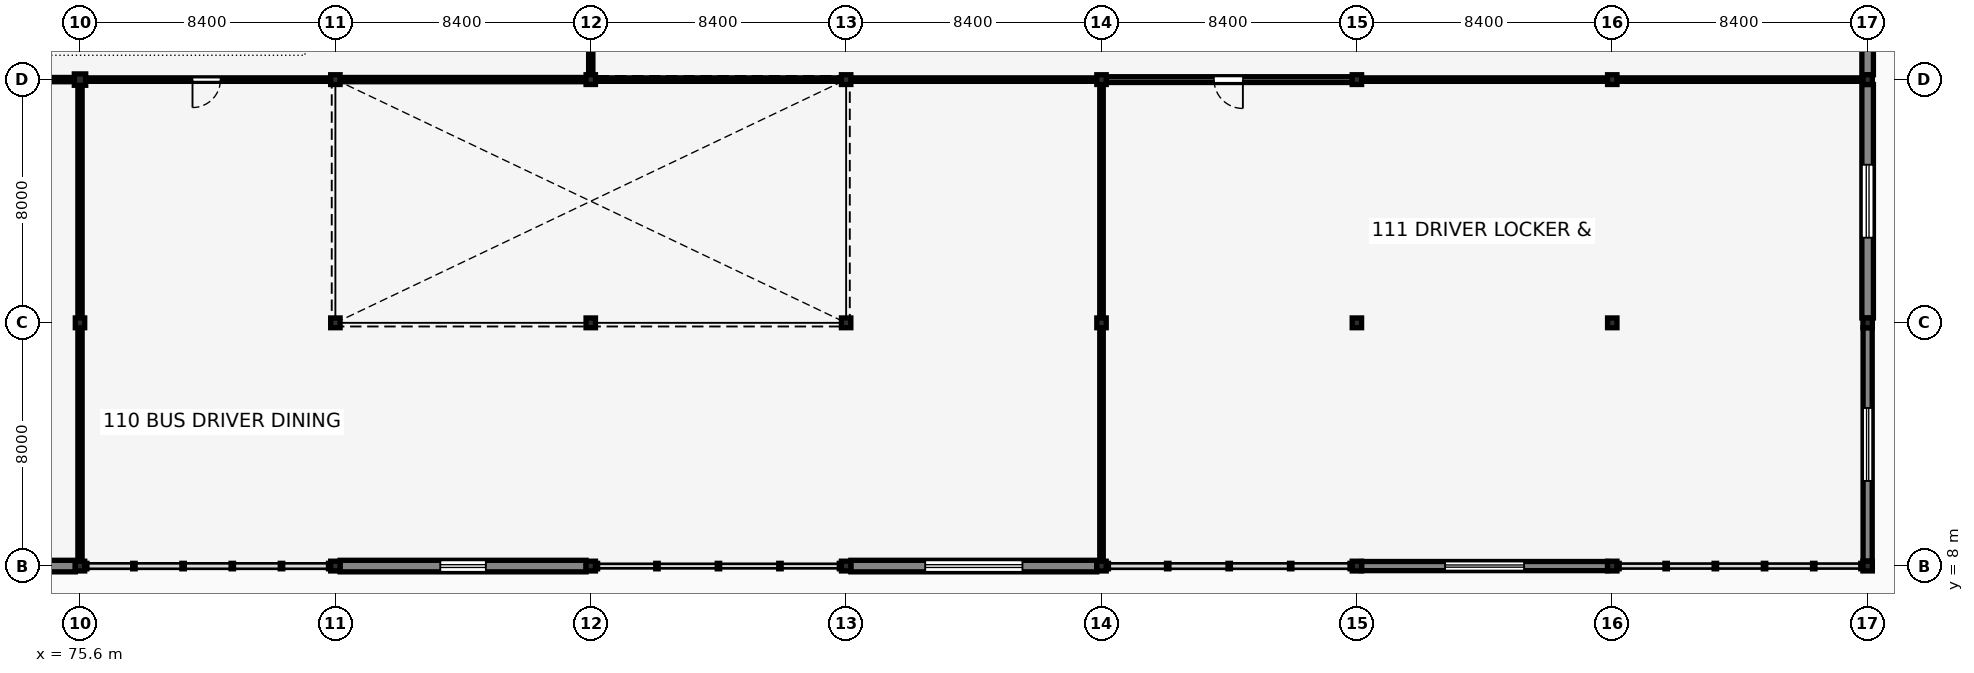
"""IFC4 building model, lengths in metres.
Left out: names, types, materials, properties, quantities, classifications, styles, units other than length and angle.
Written with IfcOpenShell. Run it as: python <this file> out.ifc"""

import sys

from ifc_helpers import new_model, si_unit, direction, frame, frame_2d, origin, origin_2d, place, context, subcontext, project, spatial, rectangle, i_section, extrude, element, fill, save


model = new_model("IFC4")
c1 = context("Model", 3, precision=1e-05, world=origin(), true_north=direction((0.0, 1.0)))
c2 = subcontext(c1, "Body", "Model", "MODEL_VIEW")
j1 = project(units=[si_unit("LENGTHUNIT", "METRE"), si_unit("PLANEANGLEUNIT", "RADIAN")], contexts=[c1])
p1 = place(None, origin())
s1 = spatial("IfcSite", under=j1, at=p1, CompositionType="ELEMENT")
p2 = place(p1, origin())
s2 = spatial("IfcBuilding", under=s1, at=p2, CompositionType="ELEMENT")
p3 = place(p2, frame((0.0, 0.0, 5.44)))
s3 = spatial("IfcBuildingStorey", under=s2, at=p3, CompositionType="ELEMENT", Elevation=5.44)
for number, where, z_axis, x_axis in (
    (1, (75.6, 8.0, 0.0), (0.0, 0.0, 1.0), (1.0, 0.0, 0.0)),
    (2, (75.6, 16.0, 0.0), (0.0, 0.0, 1.0), (1.0, 0.0, 0.0)),
):
    element("IfcColumn", number, at=place(p3, frame(where, z_axis=z_axis, x_axis=x_axis)), inside=s3, PredefinedType="COLUMN", context=c2, shape_type="SweptSolid", body=[
        extrude(i_section(OverallWidth=0.309, OverallDepth=0.321, WebThickness=0.014, FlangeThickness=0.022, FilletRadius=0.015, at=origin_2d()), origin(), (0.0, 0.0, 1.0), 3.8),
    ])
p4 = place(p3, frame((75.6, 24.0, 0.0), z_axis=(0.0, 0.0, 1.0), x_axis=(1.0, 0.0, 0.0)))
e3 = element("IfcColumn", 3, at=p4, inside=s3, PredefinedType="COLUMN", context=c2, shape_type="SweptSolid", body=[
    extrude(i_section(OverallWidth=0.375, OverallDepth=0.375, WebThickness=0.017, FlangeThickness=0.027, FilletRadius=0.015, at=origin_2d()), origin(), (0.0, 0.0, 1.0), 3.8),
])
for number, where, z_axis, x_axis in (
    (4, (84.0, 8.0, 0.0), (0.0, 0.0, 1.0), (1.0, 0.0, 0.0)),
    (5, (84.0, 16.0, 0.0), (0.0, 0.0, 1.0), (1.0, 0.0, 0.0)),
    (6, (84.0, 24.0, 0.0), (0.0, 0.0, 1.0), (1.0, 0.0, 0.0)),
    (7, (92.4, 8.0, 0.0), (0.0, 0.0, 1.0), (1.0, 0.0, 0.0)),
    (8, (92.4, 16.0, 0.0), (0.0, 0.0, 1.0), (1.0, 0.0, 0.0)),
    (9, (92.4, 24.0, 0.0), (0.0, 0.0, 1.0), (1.0, 0.0, 0.0)),
    (10, (100.8, 8.0, 0.0), (0.0, 0.0, 1.0), (1.0, 0.0, 0.0)),
    (11, (100.8, 16.0, 0.0), (0.0, 0.0, 1.0), (1.0, 0.0, 0.0)),
    (12, (100.8, 24.0, 0.0), (0.0, 0.0, 1.0), (1.0, 0.0, 0.0)),
    (13, (109.2, 8.0, 0.0), (0.0, 0.0, 1.0), (1.0, 0.0, 0.0)),
    (14, (109.2, 16.0, 0.0), (0.0, 0.0, 1.0), (1.0, 0.0, 0.0)),
    (15, (109.2, 24.0, 0.0), (0.0, 0.0, 1.0), (1.0, 0.0, 0.0)),
    (16, (117.6, 8.0, 0.0), (0.0, 0.0, 1.0), (1.0, 0.0, 0.0)),
    (17, (117.6, 16.0, 0.0), (0.0, 0.0, 1.0), (1.0, 0.0, 0.0)),
    (18, (117.6, 24.0, 0.0), (0.0, 0.0, 1.0), (1.0, 0.0, 0.0)),
    (19, (126.0, 8.0, 0.0), (0.0, 0.0, 1.0), (1.0, 0.0, 0.0)),
    (20, (126.0, 16.0, 0.0), (0.0, 0.0, 1.0), (1.0, 0.0, 0.0)),
    (21, (126.0, 24.0, 0.0), (0.0, 0.0, 1.0), (1.0, 0.0, 0.0)),
    (22, (134.4, 8.0, 0.0), (0.0, 0.0, 1.0), (1.0, 0.0, 0.0)),
    (23, (134.4, 16.0, 0.0), (0.0, 0.0, 1.0), (1.0, 0.0, 0.0)),
    (24, (134.4, 24.0, 0.0), (0.0, 0.0, 1.0), (1.0, 0.0, 0.0)),
):
    element("IfcColumn", number, at=place(p3, frame(where, z_axis=z_axis, x_axis=x_axis)), inside=s3, PredefinedType="COLUMN", context=c2, shape_type="SweptSolid", body=[
        extrude(i_section(OverallWidth=0.309, OverallDepth=0.321, WebThickness=0.014, FlangeThickness=0.022, FilletRadius=0.015, at=origin_2d()), origin(), (0.0, 0.0, 1.0), 3.8),
    ])
p5 = place(p3, frame((134.4, 8.16, 0.0), z_axis=(0.0, 0.0, 1.0), x_axis=(0.0, 1.0, 0.0)))
e25 = element("IfcWall", 25, at=p5, inside=s3, PredefinedType="SOLIDWALL", context=c2, shape_type="SweptSolid", body=[
    extrude(rectangle(XDim=7.679, YDim=0.3, at=frame_2d((3.84, 0.0))), origin(), (0.0, 0.0, 1.0), 3.442),
])
p6 = place(p5, frame((2.64, 0.0, 0.9), z_axis=(0.0, 0.0, 1.0), x_axis=(1.0, 0.0, 0.0)))
e26 = element("IfcOpeningElement", 26, at=p6, cuts=e25, PredefinedType="OPENING", context=c2, shape_type="SweptSolid", body=[
    extrude(rectangle(XDim=2.4, YDim=1.75, at=frame_2d((1.2, 0.875))), frame((0.0, 0.16, 0.0), z_axis=(0.0, -1.0, 0.0), x_axis=(1.0, 0.0, 0.0)), (0.0, 0.0, 1.0), 0.32),
])
p7 = place(p3, frame((134.4, 16.16, 0.0), z_axis=(0.0, 0.0, 1.0), x_axis=(0.0, 1.0, 0.0)))
e27 = element("IfcWall", 27, at=p7, inside=s3, PredefinedType="SOLIDWALL", context=c2, shape_type="SweptSolid", body=[
    extrude(rectangle(XDim=7.679, YDim=0.38, at=frame_2d((3.84, 0.0))), origin(), (0.0, 0.0, 1.0), 3.442),
])
p8 = place(p7, frame((2.64, 0.0, 0.9), z_axis=(0.0, 0.0, 1.0), x_axis=(1.0, 0.0, 0.0)))
e28 = element("IfcOpeningElement", 28, at=p8, cuts=e27, PredefinedType="OPENING", context=c2, shape_type="SweptSolid", body=[
    extrude(rectangle(XDim=2.4, YDim=1.5, at=frame_2d((1.2, 0.75))), frame((0.0, 0.2, 0.0), z_axis=(0.0, -1.0, 0.0), x_axis=(1.0, 0.0, 0.0)), (0.0, 0.0, 1.0), 0.4),
])
p9 = place(p3, frame((134.4, 24.16, 0.0), z_axis=(0.0, 0.0, 1.0), x_axis=(0.0, 1.0, 0.0)))
e29 = element("IfcWall", 29, at=p9, inside=s3, PredefinedType="SOLIDWALL", context=c2, shape_type="SweptSolid", body=[
    extrude(rectangle(XDim=7.679, YDim=0.38, at=frame_2d((3.84, 0.0))), origin(), (0.0, 0.0, 1.0), 3.442),
])
p10 = place(p9, frame((2.74, 0.0, 0.9), z_axis=(0.0, 0.0, 1.0), x_axis=(1.0, 0.0, 0.0)))
e30 = element("IfcOpeningElement", 30, at=p10, cuts=e29, PredefinedType="OPENING", context=c2, shape_type="SweptSolid", body=[
    extrude(rectangle(XDim=2.2, YDim=1.5, at=frame_2d((1.1, 0.75))), frame((0.0, 0.2, 0.0), z_axis=(0.0, -1.0, 0.0), x_axis=(1.0, 0.0, 0.0)), (0.0, 0.0, 1.0), 0.4),
])
p11 = place(p3, frame((67.354, 8.0, 0.0), z_axis=(0.0, 0.0, 1.0), x_axis=(1.0, 0.0, 0.0)))
e31 = element("IfcWall", 31, at=p11, inside=s3, PredefinedType="SOLIDWALL", context=c2, shape_type="SweptSolid", body=[
    extrude(rectangle(XDim=8.091, YDim=0.38, at=frame_2d((4.045, 0.0))), origin(), (0.0, 0.0, 1.0), 3.45),
])
p12 = place(p11, frame((3.146, 0.0, 0.9), z_axis=(0.0, 0.0, 1.0), x_axis=(1.0, 0.0, 0.0)))
e32 = element("IfcOpeningElement", 32, at=p12, cuts=e31, PredefinedType="OPENING", context=c2, shape_type="SweptSolid", body=[
    extrude(rectangle(XDim=1.8, YDim=1.3, at=frame_2d((0.9, 0.65))), frame((0.0, 0.2, 0.0), z_axis=(0.0, -1.0, 0.0), x_axis=(1.0, 0.0, 0.0)), (0.0, 0.0, 1.0), 0.4),
])
p13 = place(p3, frame((84.155, 8.0, 0.0), z_axis=(0.0, 0.0, 1.0), x_axis=(1.0, 0.0, 0.0)))
e33 = element("IfcWall", 33, at=p13, inside=s3, PredefinedType="SOLIDWALL", context=c2, shape_type="SweptSolid", body=[
    extrude(rectangle(XDim=8.091, YDim=0.38, at=frame_2d((4.045, 0.0))), origin(), (0.0, 0.0, 1.0), 3.45),
])
p14 = place(p13, frame((3.295, 0.0, 0.9), z_axis=(0.0, 0.0, 1.0), x_axis=(1.0, 0.0, 0.0)))
e34 = element("IfcOpeningElement", 34, at=p14, cuts=e33, PredefinedType="OPENING", context=c2, shape_type="SweptSolid", body=[
    extrude(rectangle(XDim=1.5, YDim=1.4, at=frame_2d((0.75, 0.7))), frame((0.0, 0.2, 0.0), z_axis=(0.0, -1.0, 0.0), x_axis=(1.0, 0.0, 0.0)), (0.0, 0.0, 1.0), 0.4),
])
p15 = place(p3, frame((100.955, 8.0, 0.0), z_axis=(0.0, 0.0, 1.0), x_axis=(1.0, 0.0, 0.0)))
e35 = element("IfcWall", 35, at=p15, inside=s3, PredefinedType="SOLIDWALL", context=c2, shape_type="SweptSolid", body=[
    extrude(rectangle(XDim=8.091, YDim=0.38, at=frame_2d((4.045, 0.0))), origin(), (0.0, 0.0, 1.0), 3.45),
])
p16 = place(p15, frame((2.445, 0.0, 1.55), z_axis=(0.0, 0.0, 1.0), x_axis=(1.0, 0.0, 0.0)))
e36 = element("IfcOpeningElement", 36, at=p16, cuts=e35, PredefinedType="OPENING", context=c2, shape_type="SweptSolid", body=[
    extrude(rectangle(XDim=3.2, YDim=0.9, at=frame_2d((1.6, 0.45))), frame((0.0, 0.2, 0.0), z_axis=(0.0, -1.0, 0.0), x_axis=(1.0, 0.0, 0.0)), (0.0, 0.0, 1.0), 0.4),
])
p17 = place(p3, frame((117.755, 8.0, 0.0), z_axis=(0.0, 0.0, 1.0), x_axis=(1.0, 0.0, 0.0)))
e37 = element("IfcWall", 37, at=p17, inside=s3, PredefinedType="SOLIDWALL", context=c2, shape_type="SweptSolid", body=[
    extrude(rectangle(XDim=8.091, YDim=0.3, at=frame_2d((4.045, 0.0))), origin(), (0.0, 0.0, 1.0), 3.45),
])
p18 = place(p17, frame((2.745, 0.0, 1.55), z_axis=(0.0, 0.0, 1.0), x_axis=(1.0, 0.0, 0.0)))
e38 = element("IfcOpeningElement", 38, at=p18, cuts=e37, PredefinedType="OPENING", context=c2, shape_type="SweptSolid", body=[
    extrude(rectangle(XDim=2.6, YDim=0.85, at=frame_2d((1.3, 0.425))), frame((0.0, 0.16, 0.0), z_axis=(0.0, -1.0, 0.0), x_axis=(1.0, 0.0, 0.0)), (0.0, 0.0, 1.0), 0.32),
])
p19 = place(p3, frame((75.777, 24.0, 0.0), z_axis=(0.0, 0.0, 1.0), x_axis=(1.0, 0.0, 0.0)))
e39 = element("IfcWall", 39, at=p19, inside=s3, PredefinedType="PARTITIONING", context=c2, shape_type="SweptSolid", body=[
    extrude(rectangle(XDim=8.078, YDim=0.115, at=frame_2d((4.039, 0.0))), origin(), (0.0, 0.0, 1.0), 3.26),
])
p20 = place(p19, frame((4.443, 0.0, 0.0), z_axis=(0.0, 0.0, 1.0), x_axis=(-1.0, 0.0, 0.0)))
e40 = element("IfcOpeningElement", 40, at=p20, cuts=e39, PredefinedType="OPENING", context=c2, shape_type="SweptSolid", body=[
    extrude(rectangle(XDim=0.92, YDim=2.12, at=frame_2d((0.46, 1.06))), frame((0.0, 0.067, 0.0), z_axis=(0.0, -1.0, 0.0), x_axis=(1.0, 0.0, 0.0)), (0.0, 0.0, 1.0), 0.135),
])
p21 = place(p3, frame((109.344, 24.0, 0.0), z_axis=(0.0, 0.0, 1.0), x_axis=(1.0, 0.0, 0.0)))
e41 = element("IfcWall", 41, at=p21, inside=s3, PredefinedType="PLUMBINGWALL", context=c2, shape_type="SweptSolid", body=[
    extrude(rectangle(XDim=8.111, YDim=0.19, at=frame_2d((4.055, 0.0))), origin(), (0.0, 0.0, 1.0), 3.26),
])
p22 = place(p21, frame((4.505, 0.0, 0.0), z_axis=(0.0, 0.0, 1.0), x_axis=(-1.0, 0.0, 0.0)))
e42 = element("IfcOpeningElement", 42, at=p22, cuts=e41, PredefinedType="OPENING", context=c2, shape_type="SweptSolid", body=[
    extrude(rectangle(XDim=0.95, YDim=2.15, at=frame_2d((0.475, 1.075))), frame((0.0, 0.105, 0.0), z_axis=(0.0, -1.0, 0.0), x_axis=(1.0, 0.0, 0.0)), (0.0, 0.0, 1.0), 0.21),
])
p23 = place(p3, frame((67.377, 24.0, 0.0), z_axis=(0.0, 0.0, 1.0), x_axis=(1.0, 0.0, 0.0)))
e43 = element("IfcWall", 43, at=p23, inside=s3, PredefinedType="PARTITIONING", context=c2, shape_type="SweptSolid", body=[
    extrude(rectangle(XDim=8.045, YDim=0.14, at=frame_2d((4.023, 0.0))), origin(), (0.0, 0.0, 1.0), 3.26),
])
p24 = place(p3, frame((84.145, 24.0, 0.0), z_axis=(0.0, 0.0, 1.0), x_axis=(1.0, 0.0, 0.0)))
e44 = element("IfcWall", 44, at=p24, inside=s3, PredefinedType="PARTITIONING", context=c2, shape_type="SweptSolid", body=[
    extrude(rectangle(XDim=8.111, YDim=0.14, at=frame_2d((4.055, 0.0))), origin(), (0.0, 0.0, 1.0), 3.26),
])
p25 = place(p3, frame((92.4, 24.15, 0.0), z_axis=(0.0, 0.0, 1.0), x_axis=(0.0, 1.0, 0.0)))
e45 = element("IfcWall", 45, at=p25, inside=s3, PredefinedType="PARTITIONING", context=c2, shape_type="SweptSolid", body=[
    extrude(rectangle(XDim=7.699, YDim=0.14, at=frame_2d((3.85, 0.0))), origin(), (0.0, 0.0, 1.0), 3.337),
])
for number, where, z_axis, x_axis in (
    (46, (92.545, 24.0, 0.0), (0.0, 0.0, 1.0), (1.0, 0.0, 0.0)),
    (47, (100.945, 24.0, 0.0), (0.0, 0.0, 1.0), (1.0, 0.0, 0.0)),
    (48, (117.745, 24.0, 0.0), (0.0, 0.0, 1.0), (1.0, 0.0, 0.0)),
    (49, (126.145, 24.0, 0.0), (0.0, 0.0, 1.0), (1.0, 0.0, 0.0)),
):
    element("IfcWall", number, at=place(p3, frame(where, z_axis=z_axis, x_axis=x_axis)), inside=s3, PredefinedType="PARTITIONING", context=c2, shape_type="SweptSolid", body=[
        extrude(rectangle(XDim=8.111, YDim=0.115, at=frame_2d((4.055, 0.0))), origin(), (0.0, 0.0, 1.0), 3.26),
    ])
p26 = place(p3, frame((75.6, 8.15, 0.0), z_axis=(0.0, 0.0, 1.0), x_axis=(0.0, 1.0, 0.0)))
e50 = element("IfcWall", 50, at=p26, inside=s3, PredefinedType="PARTITIONING", context=c2, shape_type="SweptSolid", body=[
    extrude(rectangle(XDim=7.699, YDim=0.14, at=frame_2d((3.85, 0.0))), origin(), (0.0, 0.0, 1.0), 3.337),
])
p27 = place(p3, frame((75.6, 16.15, 0.0), z_axis=(0.0, 0.0, 1.0), x_axis=(0.0, 1.0, 0.0)))
e51 = element("IfcWall", 51, at=p27, inside=s3, PredefinedType="PARTITIONING", context=c2, shape_type="SweptSolid", body=[
    extrude(rectangle(XDim=7.672, YDim=0.14, at=frame_2d((3.836, 0.0))), origin(), (0.0, 0.0, 1.0), 3.337),
])
for number, where, z_axis, x_axis in (
    (52, (109.2, 8.15, 0.0), (0.0, 0.0, 1.0), (0.0, 1.0, 0.0)),
    (53, (109.2, 16.15, 0.0), (0.0, 0.0, 1.0), (0.0, 1.0, 0.0)),
):
    element("IfcWall", number, at=place(p3, frame(where, z_axis=z_axis, x_axis=x_axis)), inside=s3, PredefinedType="PARTITIONING", context=c2, shape_type="SweptSolid", body=[
        extrude(rectangle(XDim=7.699, YDim=0.115, at=frame_2d((3.85, 0.0))), origin(), (0.0, 0.0, 1.0), 3.337),
    ])
p28 = place(p6, origin())
e54 = element("IfcWindow", 54, at=p28, inside=s3, PartitioningType="DOUBLE_PANEL_VERTICAL", PredefinedType="WINDOW", context=c2, shape_type="SweptSolid", body=[
    extrude(rectangle(XDim=2.4, YDim=1.75, at=frame_2d((1.2, 0.875))), frame((0.0, 0.03, 0.0), z_axis=(0.0, -1.0, 0.0), x_axis=(1.0, 0.0, 0.0)), (0.0, 0.0, 1.0), 0.06),
])
fill(e26, e54)
p29 = place(p8, origin())
e55 = element("IfcWindow", 55, at=p29, inside=s3, PartitioningType="DOUBLE_PANEL_VERTICAL", PredefinedType="WINDOW", context=c2, shape_type="SweptSolid", body=[
    extrude(rectangle(XDim=2.4, YDim=1.5, at=frame_2d((1.2, 0.75))), frame((0.0, 0.03, 0.0), z_axis=(0.0, -1.0, 0.0), x_axis=(1.0, 0.0, 0.0)), (0.0, 0.0, 1.0), 0.06),
])
fill(e28, e55)
p30 = place(p14, origin())
e56 = element("IfcWindow", 56, at=p30, inside=s3, PartitioningType="SINGLE_PANEL", PredefinedType="WINDOW", context=c2, shape_type="SweptSolid", body=[
    extrude(rectangle(XDim=1.5, YDim=1.4, at=frame_2d((0.75, 0.7))), frame((0.0, 0.03, 0.0), z_axis=(0.0, -1.0, 0.0), x_axis=(1.0, 0.0, 0.0)), (0.0, 0.0, 1.0), 0.06),
])
fill(e34, e56)
p31 = place(p16, origin())
e57 = element("IfcWindow", 57, at=p31, inside=s3, PartitioningType="TRIPLE_PANEL_HORIZONTAL", PredefinedType="WINDOW", context=c2, shape_type="SweptSolid", body=[
    extrude(rectangle(XDim=3.2, YDim=0.9, at=frame_2d((1.6, 0.45))), frame((0.0, 0.03, 0.0), z_axis=(0.0, -1.0, 0.0), x_axis=(1.0, 0.0, 0.0)), (0.0, 0.0, 1.0), 0.06),
])
fill(e36, e57)
p32 = place(p18, origin())
e58 = element("IfcWindow", 58, at=p32, inside=s3, PartitioningType="DOUBLE_PANEL_HORIZONTAL", PredefinedType="WINDOW", context=c2, shape_type="SweptSolid", body=[
    extrude(rectangle(XDim=2.6, YDim=0.85, at=frame_2d((1.3, 0.425))), frame((0.0, 0.03, 0.0), z_axis=(0.0, -1.0, 0.0), x_axis=(1.0, 0.0, 0.0)), (0.0, 0.0, 1.0), 0.06),
])
fill(e38, e58)
p33 = place(p20, origin())
e59 = element("IfcDoor", 59, at=p33, inside=s3, OperationType="SINGLE_SWING_RIGHT", PredefinedType="DOOR", context=c2, shape_type="SweptSolid", body=[
    extrude(rectangle(XDim=0.92, YDim=2.12, at=frame_2d((0.46, 1.06))), frame((0.0, 0.025, 0.0), z_axis=(0.0, -1.0, 0.0), x_axis=(1.0, 0.0, 0.0)), (0.0, 0.0, 1.0), 0.05),
])
fill(e40, e59)
p34 = place(p22, origin())
e60 = element("IfcDoor", 60, at=p34, inside=s3, OperationType="SINGLE_SWING_LEFT", PredefinedType="DOOR", context=c2, shape_type="SweptSolid", body=[
    extrude(rectangle(XDim=0.95, YDim=2.15, at=frame_2d((0.475, 1.075))), frame((0.0, 0.025, 0.0), z_axis=(0.0, -1.0, 0.0), x_axis=(1.0, 0.0, 0.0)), (0.0, 0.0, 1.0), 0.05),
])
fill(e42, e60)
save(model, sys.argv[1])
